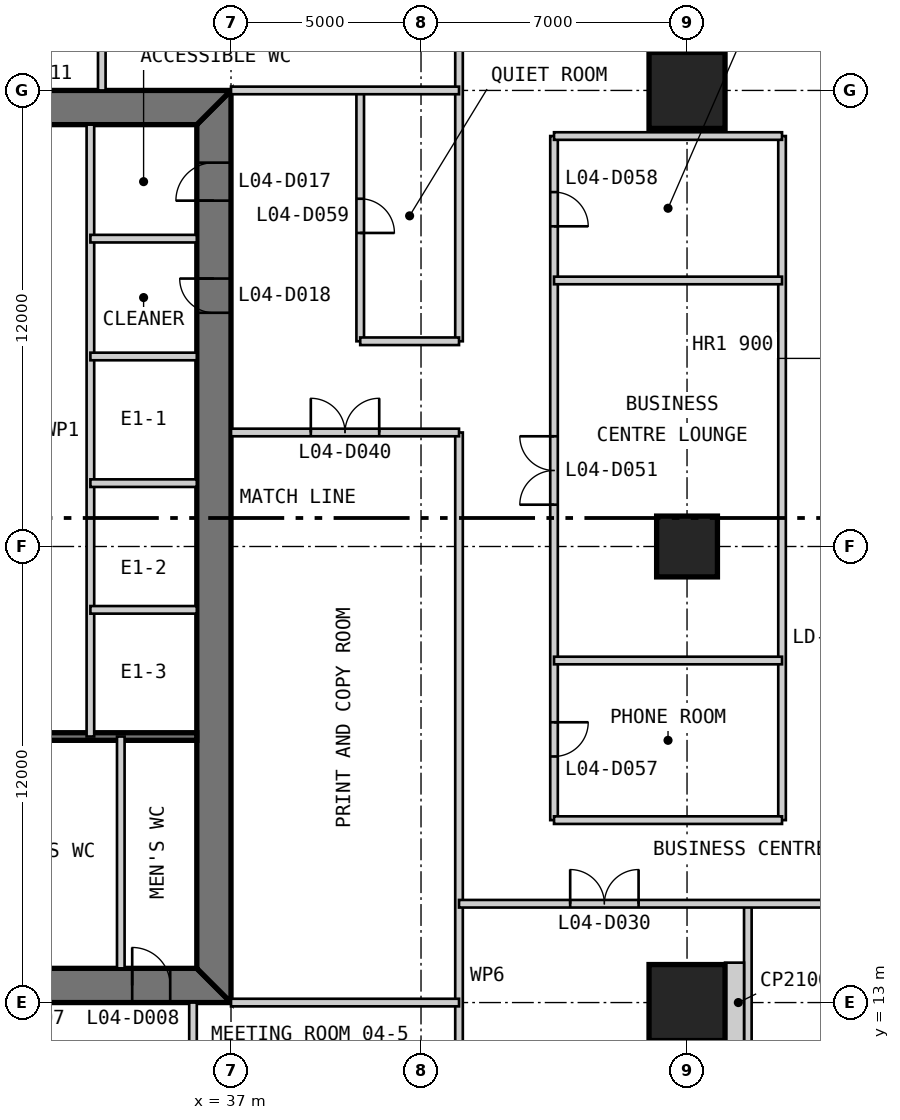
"""IFC4 building model, lengths in metres.
Left out: names, types, materials, properties, quantities, classifications, styles, units other than length and angle.
Written with IfcOpenShell. Run it as: python <this file> out.ifc"""

import sys

from ifc_helpers import new_model, si_unit, direction, frame, frame_2d, origin, origin_2d, place, context, subcontext, project, spatial, polyline, rectangle, outline, extrude, element, fill, save


model = new_model("IFC4")
c1 = context("Model", 3, precision=1e-05, world=origin(), true_north=direction((0.0, 1.0)))
c2 = subcontext(c1, "Body", "Model", "MODEL_VIEW")
j1 = project(units=[si_unit("LENGTHUNIT", "METRE"), si_unit("PLANEANGLEUNIT", "RADIAN")], contexts=[c1])
p1 = place(None, origin())
s1 = spatial("IfcSite", under=j1, at=p1, CompositionType="ELEMENT")
p2 = place(p1, origin())
s2 = spatial("IfcBuilding", under=s1, at=p2, CompositionType="ELEMENT")
p3 = place(p2, frame((0.0, 0.0, 21.4)))
s3 = spatial("IfcBuildingStorey", under=s2, at=p3, CompositionType="ELEMENT", Elevation=21.4)
p4 = place(p3, frame((49.0, 13.0, 0.0), z_axis=(0.0, 0.0, 1.0), x_axis=(1.0, 0.0, 0.0)))
e1 = element("IfcColumn", 1, at=p4, inside=s3, PredefinedType="COLUMN", context=c2, shape_type="SweptSolid", body=[
    extrude(rectangle(XDim=2.0, YDim=2.0, at=origin_2d()), origin(), (0.0, 0.0, 1.0), 4.8),
])
p5 = place(p3, frame((49.0, 25.0, 0.0), z_axis=(0.0, 0.0, 1.0), x_axis=(1.0, 0.0, 0.0)))
e2 = element("IfcColumn", 2, at=p5, inside=s3, PredefinedType="COLUMN", context=c2, shape_type="SweptSolid", body=[
    extrude(rectangle(XDim=1.6, YDim=1.6, at=origin_2d()), origin(), (0.0, 0.0, 1.0), 4.8),
])
p6 = place(p3, frame((49.0, 37.0, 0.0), z_axis=(0.0, 0.0, 1.0), x_axis=(1.0, 0.0, 0.0)))
e3 = element("IfcColumn", 3, at=p6, inside=s3, PredefinedType="COLUMN", context=c2, shape_type="SweptSolid", body=[
    extrude(rectangle(XDim=2.0, YDim=2.0, at=origin_2d()), origin(), (0.0, 0.0, 1.0), 4.8),
])
p7 = place(p3, frame((13.0, 13.45, 0.0), z_axis=(0.0, 0.0, 1.0), x_axis=(1.0, 0.0, 0.0)))
e4 = element("IfcWall", 4, at=p7, inside=s3, PredefinedType="SHEAR", context=c2, shape_type="SweptSolid", body=[
    extrude(outline(polyline([(0.0, -0.45), (24.0, -0.45), (23.1, 0.45), (0.9, 0.45), (0.0, -0.45)])), origin(), (0.0, 0.0, 1.0), 4.8),
])
p8 = place(p7, frame((4.9, 0.0, 0.0)))
e5 = element("IfcOpeningElement", 5, at=p8, cuts=e4, PredefinedType="OPENING", context=c2, shape_type="SweptSolid", body=[
    extrude(rectangle(XDim=1.0, YDim=2.2, at=frame_2d((0.5, 1.1))), frame((0.0, 0.46, 0.0), z_axis=(0.0, -1.0, 0.0), x_axis=(1.0, 0.0, 0.0)), (0.0, 0.0, 1.0), 0.92),
])
p9 = place(p7, frame((8.9, 0.0, 0.0)))
e6 = element("IfcOpeningElement", 6, at=p9, cuts=e4, PredefinedType="OPENING", context=c2, shape_type="SweptSolid", body=[
    extrude(rectangle(XDim=1.1, YDim=2.2, at=frame_2d((0.55, 1.1))), frame((0.0, 0.46, 0.0), z_axis=(0.0, -1.0, 0.0), x_axis=(1.0, 0.0, 0.0)), (0.0, 0.0, 1.0), 0.92),
])
p10 = place(p7, frame((15.05, 0.0, 0.0)))
e7 = element("IfcOpeningElement", 7, at=p10, cuts=e4, PredefinedType="OPENING", context=c2, shape_type="SweptSolid", body=[
    extrude(rectangle(XDim=0.9, YDim=2.2, at=frame_2d((0.45, 1.1))), frame((0.0, 0.46, 0.0), z_axis=(0.0, -1.0, 0.0), x_axis=(1.0, 0.0, 0.0)), (0.0, 0.0, 1.0), 0.92),
])
p11 = place(p7, frame((17.9, 0.0, 0.0)))
e8 = element("IfcOpeningElement", 8, at=p11, cuts=e4, PredefinedType="OPENING", context=c2, shape_type="SweptSolid", body=[
    extrude(rectangle(XDim=1.0, YDim=2.2, at=frame_2d((0.5, 1.1))), frame((0.0, 0.46, 0.0), z_axis=(0.0, -1.0, 0.0), x_axis=(1.0, 0.0, 0.0)), (0.0, 0.0, 1.0), 0.92),
])
p12 = place(p7, frame((21.4, 0.0, 0.0)))
e9 = element("IfcOpeningElement", 9, at=p12, cuts=e4, PredefinedType="OPENING", context=c2, shape_type="SweptSolid", body=[
    extrude(rectangle(XDim=1.0, YDim=2.2, at=frame_2d((0.5, 1.1))), frame((0.0, 0.46, 0.0), z_axis=(0.0, -1.0, 0.0), x_axis=(1.0, 0.0, 0.0)), (0.0, 0.0, 1.0), 0.92),
])
p13 = place(p3, frame((36.55, 13.9, 0.0), z_axis=(0.0, 0.0, 1.0), x_axis=(0.0, 1.0, 0.0)))
e10 = element("IfcWall", 10, at=p13, inside=s3, PredefinedType="SHEAR", context=c2, shape_type="SweptSolid", body=[
    extrude(outline(polyline([(-0.9, -0.45), (23.1, -0.45), (22.2, 0.45), (0.0, 0.45), (-0.9, -0.45)])), origin(), (0.0, 0.0, 1.0), 4.8),
])
p14 = place(p13, frame((20.2, 0.0, 0.0)))
e11 = element("IfcOpeningElement", 11, at=p14, cuts=e10, PredefinedType="OPENING", context=c2, shape_type="SweptSolid", body=[
    extrude(rectangle(XDim=1.0, YDim=2.2, at=frame_2d((0.5, 1.1))), frame((0.0, 0.46, 0.0), z_axis=(0.0, -1.0, 0.0), x_axis=(1.0, 0.0, 0.0)), (0.0, 0.0, 1.0), 0.92),
])
p15 = place(p13, frame((17.25, 0.0, 0.0)))
e12 = element("IfcOpeningElement", 12, at=p15, cuts=e10, PredefinedType="OPENING", context=c2, shape_type="SweptSolid", body=[
    extrude(rectangle(XDim=0.9, YDim=2.2, at=frame_2d((0.45, 1.1))), frame((0.0, 0.46, 0.0), z_axis=(0.0, -1.0, 0.0), x_axis=(1.0, 0.0, 0.0)), (0.0, 0.0, 1.0), 0.92),
])
p16 = place(p3, frame((37.0, 36.55, 0.0), z_axis=(0.0, 0.0, 1.0), x_axis=(-1.0, 0.0, 0.0)))
e13 = element("IfcWall", 13, at=p16, inside=s3, PredefinedType="SHEAR", context=c2, shape_type="SweptSolid", body=[
    extrude(outline(polyline([(0.0, -0.45), (24.0, -0.45), (23.1, 0.45), (0.9, 0.45), (0.0, -0.45)])), origin(), (0.0, 0.0, 1.0), 4.8),
])
p17 = place(p16, frame((4.9, 0.0, 0.0)))
e14 = element("IfcOpeningElement", 14, at=p17, cuts=e13, PredefinedType="OPENING", context=c2, shape_type="SweptSolid", body=[
    extrude(rectangle(XDim=1.0, YDim=2.2, at=frame_2d((0.5, 1.1))), frame((0.0, 0.46, 0.0), z_axis=(0.0, -1.0, 0.0), x_axis=(1.0, 0.0, 0.0)), (0.0, 0.0, 1.0), 0.92),
])
p18 = place(p16, frame((8.9, 0.0, 0.0)))
e15 = element("IfcOpeningElement", 15, at=p18, cuts=e13, PredefinedType="OPENING", context=c2, shape_type="SweptSolid", body=[
    extrude(rectangle(XDim=1.1, YDim=2.2, at=frame_2d((0.55, 1.1))), frame((0.0, 0.46, 0.0), z_axis=(0.0, -1.0, 0.0), x_axis=(1.0, 0.0, 0.0)), (0.0, 0.0, 1.0), 0.92),
])
p19 = place(p16, frame((15.05, 0.0, 0.0)))
e16 = element("IfcOpeningElement", 16, at=p19, cuts=e13, PredefinedType="OPENING", context=c2, shape_type="SweptSolid", body=[
    extrude(rectangle(XDim=0.9, YDim=2.2, at=frame_2d((0.45, 1.1))), frame((0.0, 0.46, 0.0), z_axis=(0.0, -1.0, 0.0), x_axis=(1.0, 0.0, 0.0)), (0.0, 0.0, 1.0), 0.92),
])
p20 = place(p16, frame((17.9, 0.0, 0.0)))
e17 = element("IfcOpeningElement", 17, at=p20, cuts=e13, PredefinedType="OPENING", context=c2, shape_type="SweptSolid", body=[
    extrude(rectangle(XDim=1.0, YDim=2.2, at=frame_2d((0.5, 1.1))), frame((0.0, 0.46, 0.0), z_axis=(0.0, -1.0, 0.0), x_axis=(1.0, 0.0, 0.0)), (0.0, 0.0, 1.0), 0.92),
])
p21 = place(p16, frame((21.4, 0.0, 0.0)))
e18 = element("IfcOpeningElement", 18, at=p21, cuts=e13, PredefinedType="OPENING", context=c2, shape_type="SweptSolid", body=[
    extrude(rectangle(XDim=1.0, YDim=2.2, at=frame_2d((0.5, 1.1))), frame((0.0, 0.46, 0.0), z_axis=(0.0, -1.0, 0.0), x_axis=(1.0, 0.0, 0.0)), (0.0, 0.0, 1.0), 0.92),
])
p22 = place(p3, frame((20.3, 20.0, 0.0), z_axis=(0.0, 0.0, 1.0), x_axis=(1.0, 0.0, 0.0)))
e19 = element("IfcWall", 19, at=p22, inside=s3, PredefinedType="SOLIDWALL", context=c2, shape_type="SweptSolid", body=[
    extrude(rectangle(XDim=15.8, YDim=0.2, at=frame_2d((7.9, 0.0))), origin(), (0.0, 0.0, 1.0), 4.6),
])
p23 = place(p3, frame((34.1, 13.9, 0.0), z_axis=(0.0, 0.0, 1.0), x_axis=(0.0, 1.0, 0.0)))
e20 = element("IfcWall", 20, at=p23, inside=s3, PredefinedType="PARTITIONING", context=c2, shape_type="SweptSolid", body=[
    extrude(rectangle(XDim=6.1, YDim=0.2, at=frame_2d((3.05, 0.0))), origin(), (0.0, 0.0, 1.0), 4.6),
])
p24 = place(p3, frame((33.3, 36.1, 0.0), z_axis=(0.0, 0.0, 1.0), x_axis=(0.0, -1.0, 0.0)))
e21 = element("IfcWall", 21, at=p24, inside=s3, PredefinedType="PARTITIONING", context=c2, shape_type="SweptSolid", body=[
    extrude(rectangle(XDim=16.1, YDim=0.2, at=frame_2d((8.05, 0.0))), origin(), (0.0, 0.0, 1.0), 4.6),
])
for number, where, z_axis, x_axis in (
    (22, (36.1, 30.0, 0.0), (0.0, 0.0, 1.0), (-1.0, 0.0, 0.0)),
    (23, (36.1, 26.667, 0.0), (0.0, 0.0, 1.0), (-1.0, 0.0, 0.0)),
    (24, (36.1, 23.333, 0.0), (0.0, 0.0, 1.0), (-1.0, 0.0, 0.0)),
    (25, (36.1, 33.1, 0.0), (0.0, 0.0, 1.0), (-1.0, 0.0, 0.0)),
):
    element("IfcWall", number, at=place(p3, frame(where, z_axis=z_axis, x_axis=x_axis)), inside=s3, PredefinedType="PARTITIONING", context=c2, shape_type="SweptSolid", body=[
        extrude(rectangle(XDim=2.8, YDim=0.2, at=frame_2d((1.4, 0.0))), origin(), (0.0, 0.0, 1.0), 4.6),
    ])
p25 = place(p3, frame((33.6, 37.0, 0.0), z_axis=(0.0, 0.0, 1.0), x_axis=(0.0, 1.0, 0.0)))
e26 = element("IfcWall", 26, at=p25, inside=s3, PredefinedType="PARTITIONING", context=c2, shape_type="SweptSolid", body=[
    extrude(rectangle(XDim=6.0, YDim=0.2, at=frame_2d((3.0, 0.0))), origin(), (0.0, 0.0, 1.0), 4.5),
])
p26 = place(p25, frame((2.55, 0.0, 0.0)))
e27 = element("IfcOpeningElement", 27, at=p26, cuts=e26, PredefinedType="OPENING", context=c2, shape_type="SweptSolid", body=[
    extrude(rectangle(XDim=0.9, YDim=2.2, at=frame_2d((0.45, 1.1))), frame((0.0, 0.11, 0.0), z_axis=(0.0, -1.0, 0.0), x_axis=(1.0, 0.0, 0.0)), (0.0, 0.0, 1.0), 0.22),
])
p27 = place(p3, frame((36.0, 7.0, 0.0), z_axis=(0.0, 0.0, 1.0), x_axis=(0.0, 1.0, 0.0)))
e28 = element("IfcWall", 28, at=p27, inside=s3, PredefinedType="PARTITIONING", context=c2, shape_type="SweptSolid", body=[
    extrude(rectangle(XDim=6.0, YDim=0.2, at=frame_2d((3.0, 0.0))), origin(), (0.0, 0.0, 1.0), 4.5),
])
p28 = place(p27, frame((3.3, 0.0, 0.0)))
e29 = element("IfcOpeningElement", 29, at=p28, cuts=e28, PredefinedType="OPENING", context=c2, shape_type="SweptSolid", body=[
    extrude(rectangle(XDim=0.9, YDim=2.2, at=frame_2d((0.45, 1.1))), frame((0.0, 0.11, 0.0), z_axis=(0.0, -1.0, 0.0), x_axis=(1.0, 0.0, 0.0)), (0.0, 0.0, 1.0), 0.22),
])
p29 = place(p3, frame((40.4, 30.4, 0.0), z_axis=(0.0, 0.0, 1.0), x_axis=(0.0, 1.0, 0.0)))
e30 = element("IfcWall", 30, at=p29, inside=s3, PredefinedType="PARTITIONING", context=c2, shape_type="SweptSolid", body=[
    extrude(rectangle(XDim=6.6, YDim=0.2, at=frame_2d((3.3, 0.0))), origin(), (0.0, 0.0, 1.0), 4.5),
])
p30 = place(p29, frame((2.85, 0.0, 0.0)))
e31 = element("IfcOpeningElement", 31, at=p30, cuts=e30, PredefinedType="OPENING", context=c2, shape_type="SweptSolid", body=[
    extrude(rectangle(XDim=0.9, YDim=2.2, at=frame_2d((0.45, 1.1))), frame((0.0, 0.11, 0.0), z_axis=(0.0, -1.0, 0.0), x_axis=(1.0, 0.0, 0.0)), (0.0, 0.0, 1.0), 0.22),
])
p31 = place(p3, frame((43.0, -0.6, 0.0), z_axis=(0.0, 0.0, 1.0), x_axis=(0.0, 1.0, 0.0)))
e32 = element("IfcWall", 32, at=p31, inside=s3, PredefinedType="PARTITIONING", context=c2, shape_type="SweptSolid", body=[
    extrude(rectangle(XDim=28.6, YDim=0.2, at=frame_2d((14.3, 0.0))), origin(), (0.0, 0.0, 1.0), 3.843),
])
p32 = place(p3, frame((43.0, 30.4, 0.0), z_axis=(0.0, 0.0, 1.0), x_axis=(0.0, 1.0, 0.0)))
e33 = element("IfcWall", 33, at=p32, inside=s3, PredefinedType="PARTITIONING", context=c2, shape_type="SweptSolid", body=[
    extrude(rectangle(XDim=27.2, YDim=0.2, at=frame_2d((13.6, 0.0))), origin(), (0.0, 0.0, 1.0), 3.843),
])
p33 = place(p3, frame((45.5, 17.8, 0.0), z_axis=(0.0, 0.0, 1.0), x_axis=(0.0, 1.0, 0.0)))
e34 = element("IfcWall", 34, at=p33, inside=s3, PredefinedType="PARTITIONING", context=c2, shape_type="SweptSolid", body=[
    extrude(rectangle(XDim=18.0, YDim=0.2, at=frame_2d((9.0, 0.0))), origin(), (0.0, 0.0, 1.0), 4.5),
])
p34 = place(p33, frame((8.3, 0.0, 0.0)))
e35 = element("IfcOpeningElement", 35, at=p34, cuts=e34, PredefinedType="OPENING", context=c2, shape_type="SweptSolid", body=[
    extrude(rectangle(XDim=1.8, YDim=2.4, at=frame_2d((0.9, 1.2))), frame((0.0, 0.11, 0.0), z_axis=(0.0, -1.0, 0.0), x_axis=(1.0, 0.0, 0.0)), (0.0, 0.0, 1.0), 0.22),
])
p35 = place(p33, frame((1.675, 0.0, 0.0)))
e36 = element("IfcOpeningElement", 36, at=p35, cuts=e34, PredefinedType="OPENING", context=c2, shape_type="SweptSolid", body=[
    extrude(rectangle(XDim=0.9, YDim=2.2, at=frame_2d((0.45, 1.1))), frame((0.0, 0.11, 0.0), z_axis=(0.0, -1.0, 0.0), x_axis=(1.0, 0.0, 0.0)), (0.0, 0.0, 1.0), 0.22),
])
p36 = place(p33, frame((15.625, 0.0, 0.0)))
e37 = element("IfcOpeningElement", 37, at=p36, cuts=e34, PredefinedType="OPENING", context=c2, shape_type="SweptSolid", body=[
    extrude(rectangle(XDim=0.9, YDim=2.2, at=frame_2d((0.45, 1.1))), frame((0.0, 0.11, 0.0), z_axis=(0.0, -1.0, 0.0), x_axis=(1.0, 0.0, 0.0)), (0.0, 0.0, 1.0), 0.22),
])
p37 = place(p3, frame((50.6, -7.25, 0.0), z_axis=(0.0, 0.0, 1.0), x_axis=(0.0, 1.0, 0.0)))
e38 = element("IfcWall", 38, at=p37, inside=s3, PredefinedType="PARTITIONING", context=c2, shape_type="SweptSolid", body=[
    extrude(rectangle(XDim=22.85, YDim=0.2, at=frame_2d((11.425, 0.0))), origin(), (0.0, 0.0, 1.0), 4.5),
])
p38 = place(p3, frame((51.5, 17.8, 0.0), z_axis=(0.0, 0.0, 1.0), x_axis=(0.0, 1.0, 0.0)))
e39 = element("IfcWall", 39, at=p38, inside=s3, PredefinedType="PARTITIONING", context=c2, shape_type="SweptSolid", body=[
    extrude(rectangle(XDim=18.0, YDim=0.2, at=frame_2d((9.0, 0.0))), origin(), (0.0, 0.0, 1.0), 4.5),
])
p39 = place(p3, frame((37.0, 13.0, 0.0), z_axis=(0.0, 0.0, 1.0), x_axis=(1.0, 0.0, 0.0)))
e40 = element("IfcWall", 40, at=p39, inside=s3, PredefinedType="PARTITIONING", context=c2, shape_type="SweptSolid", body=[
    extrude(rectangle(XDim=6.0, YDim=0.2, at=frame_2d((3.0, 0.0))), origin(), (0.0, 0.0, 1.0), 3.653),
])
p40 = place(p3, frame((43.0, 15.6, 0.0), z_axis=(0.0, 0.0, 1.0), x_axis=(1.0, 0.0, 0.0)))
e41 = element("IfcWall", 41, at=p40, inside=s3, PredefinedType="PARTITIONING", context=c2, shape_type="SweptSolid", body=[
    extrude(rectangle(XDim=14.25, YDim=0.2, at=frame_2d((7.125, 0.0))), origin(), (0.0, 0.0, 1.0), 4.5),
])
p41 = place(p40, frame((10.0, 0.0, 0.0)))
e42 = element("IfcOpeningElement", 42, at=p41, cuts=e41, PredefinedType="OPENING", context=c2, shape_type="SweptSolid", body=[
    extrude(rectangle(XDim=1.8, YDim=2.4, at=frame_2d((0.9, 1.2))), frame((0.0, 0.11, 0.0), z_axis=(0.0, -1.0, 0.0), x_axis=(1.0, 0.0, 0.0)), (0.0, 0.0, 1.0), 0.22),
])
p42 = place(p40, frame((2.925, 0.0, 0.0)))
e43 = element("IfcOpeningElement", 43, at=p42, cuts=e41, PredefinedType="OPENING", context=c2, shape_type="SweptSolid", body=[
    extrude(rectangle(XDim=1.8, YDim=2.4, at=frame_2d((0.9, 1.2))), frame((0.0, 0.11, 0.0), z_axis=(0.0, -1.0, 0.0), x_axis=(1.0, 0.0, 0.0)), (0.0, 0.0, 1.0), 0.22),
])
for number, where, z_axis, x_axis in (
    (44, (45.5, 17.8, 0.0), (0.0, 0.0, 1.0), (1.0, 0.0, 0.0)),
    (45, (45.5, 22.0, 0.0), (0.0, 0.0, 1.0), (1.0, 0.0, 0.0)),
):
    element("IfcWall", number, at=place(p3, frame(where, z_axis=z_axis, x_axis=x_axis)), inside=s3, PredefinedType="PARTITIONING", context=c2, shape_type="SweptSolid", body=[
        extrude(rectangle(XDim=6.0, YDim=0.2, at=frame_2d((3.0, 0.0))), origin(), (0.0, 0.0, 1.0), 4.5),
    ])
p43 = place(p3, frame((37.0, 28.0, 0.0), z_axis=(0.0, 0.0, 1.0), x_axis=(1.0, 0.0, 0.0)))
e46 = element("IfcWall", 46, at=p43, inside=s3, PredefinedType="PARTITIONING", context=c2, shape_type="SweptSolid", body=[
    extrude(rectangle(XDim=6.0, YDim=0.2, at=frame_2d((3.0, 0.0))), origin(), (0.0, 0.0, 1.0), 4.5),
])
p44 = place(p43, frame((2.1, 0.0, 0.0)))
e47 = element("IfcOpeningElement", 47, at=p44, cuts=e46, PredefinedType="OPENING", context=c2, shape_type="SweptSolid", body=[
    extrude(rectangle(XDim=1.8, YDim=2.4, at=frame_2d((0.9, 1.2))), frame((0.0, 0.11, 0.0), z_axis=(0.0, -1.0, 0.0), x_axis=(1.0, 0.0, 0.0)), (0.0, 0.0, 1.0), 0.22),
])
p45 = place(p3, frame((40.4, 30.4, 0.0), z_axis=(0.0, 0.0, 1.0), x_axis=(1.0, 0.0, 0.0)))
e48 = element("IfcWall", 48, at=p45, inside=s3, PredefinedType="PARTITIONING", context=c2, shape_type="SweptSolid", body=[
    extrude(rectangle(XDim=2.6, YDim=0.2, at=frame_2d((1.3, 0.0))), origin(), (0.0, 0.0, 1.0), 4.5),
])
for number, where, z_axis, x_axis in (
    (49, (45.5, 32.0, 0.0), (0.0, 0.0, 1.0), (1.0, 0.0, 0.0)),
    (50, (45.5, 35.8, 0.0), (0.0, 0.0, 1.0), (1.0, 0.0, 0.0)),
):
    element("IfcWall", number, at=place(p3, frame(where, z_axis=z_axis, x_axis=x_axis)), inside=s3, PredefinedType="PARTITIONING", context=c2, shape_type="SweptSolid", body=[
        extrude(rectangle(XDim=6.0, YDim=0.2, at=frame_2d((3.0, 0.0))), origin(), (0.0, 0.0, 1.0), 4.5),
    ])
p46 = place(p3, frame((37.0, 37.0, 0.0), z_axis=(0.0, 0.0, 1.0), x_axis=(1.0, 0.0, 0.0)))
e51 = element("IfcWall", 51, at=p46, inside=s3, PredefinedType="PARTITIONING", context=c2, shape_type="SweptSolid", body=[
    extrude(rectangle(XDim=6.0, YDim=0.2, at=frame_2d((3.0, 0.0))), origin(), (0.0, 0.0, 1.0), 3.653),
])
p47 = place(p3, frame((50.5, 13.0, 0.0), z_axis=(0.0, 0.0, 1.0), x_axis=(-1.0, 0.0, 0.0)))
e52 = element("IfcWall", 52, at=p47, inside=s3, PredefinedType="PARTITIONING", context=c2, shape_type="SweptSolid", body=[
    extrude(rectangle(XDim=0.5, YDim=2.1, at=frame_2d((0.25, 0.0))), origin(), (0.0, 0.0, 1.0), 4.5),
])
p48 = place(p12, origin())
e53 = element("IfcDoor", 53, at=p48, inside=s3, OperationType="SINGLE_SWING_LEFT", PredefinedType="DOOR", context=c2, shape_type="SweptSolid", body=[
    extrude(rectangle(XDim=1.0, YDim=2.2, at=frame_2d((0.5, 1.1))), frame((0.0, 0.025, 0.0), z_axis=(0.0, -1.0, 0.0), x_axis=(1.0, 0.0, 0.0)), (0.0, 0.0, 1.0), 0.05),
    extrude(outline(polyline([(0.0, 0.0), (0.04, 0.0), (0.04, 2.16), (0.96, 2.16), (0.96, 0.0), (1.0, 0.0), (1.0, 2.2), (0.0, 2.2), (0.0, 0.0)])), frame((0.0, 0.3, 0.0), z_axis=(0.0, -1.0, 0.0), x_axis=(1.0, 0.0, 0.0)), (0.0, 0.0, 1.0), 0.6),
])
fill(e9, e53)
p49 = place(p14, origin())
e54 = element("IfcDoor", 54, at=p49, inside=s3, OperationType="SINGLE_SWING_LEFT", PredefinedType="DOOR", context=c2, shape_type="SweptSolid", body=[
    extrude(rectangle(XDim=1.0, YDim=2.2, at=frame_2d((0.5, 1.1))), frame((0.0, 0.025, 0.0), z_axis=(0.0, -1.0, 0.0), x_axis=(1.0, 0.0, 0.0)), (0.0, 0.0, 1.0), 0.05),
    extrude(outline(polyline([(0.0, 0.0), (0.04, 0.0), (0.04, 2.16), (0.96, 2.16), (0.96, 0.0), (1.0, 0.0), (1.0, 2.2), (0.0, 2.2), (0.0, 0.0)])), frame((0.0, 0.3, 0.0), z_axis=(0.0, -1.0, 0.0), x_axis=(1.0, 0.0, 0.0)), (0.0, 0.0, 1.0), 0.6),
])
fill(e11, e54)
p50 = place(p15, origin())
e55 = element("IfcDoor", 55, at=p50, inside=s3, OperationType="SINGLE_SWING_RIGHT", PredefinedType="DOOR", context=c2, shape_type="SweptSolid", body=[
    extrude(rectangle(XDim=0.9, YDim=2.2, at=frame_2d((0.45, 1.1))), frame((0.0, 0.025, 0.0), z_axis=(0.0, -1.0, 0.0), x_axis=(1.0, 0.0, 0.0)), (0.0, 0.0, 1.0), 0.05),
    extrude(outline(polyline([(0.0, 0.0), (0.04, 0.0), (0.04, 2.16), (0.86, 2.16), (0.86, 0.0), (0.9, 0.0), (0.9, 2.2), (0.0, 2.2), (0.0, 0.0)])), frame((0.0, 0.3, 0.0), z_axis=(0.0, -1.0, 0.0), x_axis=(1.0, 0.0, 0.0)), (0.0, 0.0, 1.0), 0.6),
])
fill(e12, e55)
p51 = place(p42, origin())
e56 = element("IfcDoor", 56, at=p51, inside=s3, OperationType="DOUBLE_DOOR_SINGLE_SWING", PredefinedType="DOOR", context=c2, shape_type="SweptSolid", body=[
    extrude(rectangle(XDim=1.8, YDim=2.4, at=frame_2d((0.9, 1.2))), frame((0.0, 0.025, 0.0), z_axis=(0.0, -1.0, 0.0), x_axis=(1.0, 0.0, 0.0)), (0.0, 0.0, 1.0), 0.05),
])
fill(e43, e56)
p52 = place(p44, origin())
e57 = element("IfcDoor", 57, at=p52, inside=s3, OperationType="DOUBLE_DOOR_SINGLE_SWING", PredefinedType="DOOR", context=c2, shape_type="SweptSolid", body=[
    extrude(rectangle(XDim=1.8, YDim=2.4, at=frame_2d((0.9, 1.2))), frame((0.0, 0.025, 0.0), z_axis=(0.0, -1.0, 0.0), x_axis=(1.0, 0.0, 0.0)), (0.0, 0.0, 1.0), 0.05),
])
fill(e47, e57)
p53 = place(p34, origin())
e58 = element("IfcDoor", 58, at=p53, inside=s3, OperationType="DOUBLE_DOOR_SINGLE_SWING", PredefinedType="DOOR", context=c2, shape_type="SweptSolid", body=[
    extrude(rectangle(XDim=1.8, YDim=2.4, at=frame_2d((0.9, 1.2))), frame((0.0, 0.025, 0.0), z_axis=(0.0, -1.0, 0.0), x_axis=(1.0, 0.0, 0.0)), (0.0, 0.0, 1.0), 0.05),
])
fill(e35, e58)
p54 = place(p35, frame((0.9, 0.0, 0.0), z_axis=(0.0, 0.0, 1.0), x_axis=(-1.0, 0.0, 0.0)))
e59 = element("IfcDoor", 59, at=p54, inside=s3, OperationType="SINGLE_SWING_LEFT", PredefinedType="DOOR", context=c2, shape_type="SweptSolid", body=[
    extrude(rectangle(XDim=0.9, YDim=2.2, at=frame_2d((0.45, 1.1))), frame((0.0, 0.025, 0.0), z_axis=(0.0, -1.0, 0.0), x_axis=(1.0, 0.0, 0.0)), (0.0, 0.0, 1.0), 0.05),
])
fill(e36, e59)
p55 = place(p36, frame((0.9, 0.0, 0.0), z_axis=(0.0, 0.0, 1.0), x_axis=(-1.0, 0.0, 0.0)))
e60 = element("IfcDoor", 60, at=p55, inside=s3, OperationType="SINGLE_SWING_RIGHT", PredefinedType="DOOR", context=c2, shape_type="SweptSolid", body=[
    extrude(rectangle(XDim=0.9, YDim=2.2, at=frame_2d((0.45, 1.1))), frame((0.0, 0.025, 0.0), z_axis=(0.0, -1.0, 0.0), x_axis=(1.0, 0.0, 0.0)), (0.0, 0.0, 1.0), 0.05),
])
fill(e37, e60)
p56 = place(p30, frame((0.9, 0.0, 0.0), z_axis=(0.0, 0.0, 1.0), x_axis=(-1.0, 0.0, 0.0)))
e61 = element("IfcDoor", 61, at=p56, inside=s3, OperationType="SINGLE_SWING_RIGHT", PredefinedType="DOOR", context=c2, shape_type="SweptSolid", body=[
    extrude(rectangle(XDim=0.9, YDim=2.2, at=frame_2d((0.45, 1.1))), frame((0.0, 0.025, 0.0), z_axis=(0.0, -1.0, 0.0), x_axis=(1.0, 0.0, 0.0)), (0.0, 0.0, 1.0), 0.05),
])
fill(e31, e61)
save(model, sys.argv[1])
